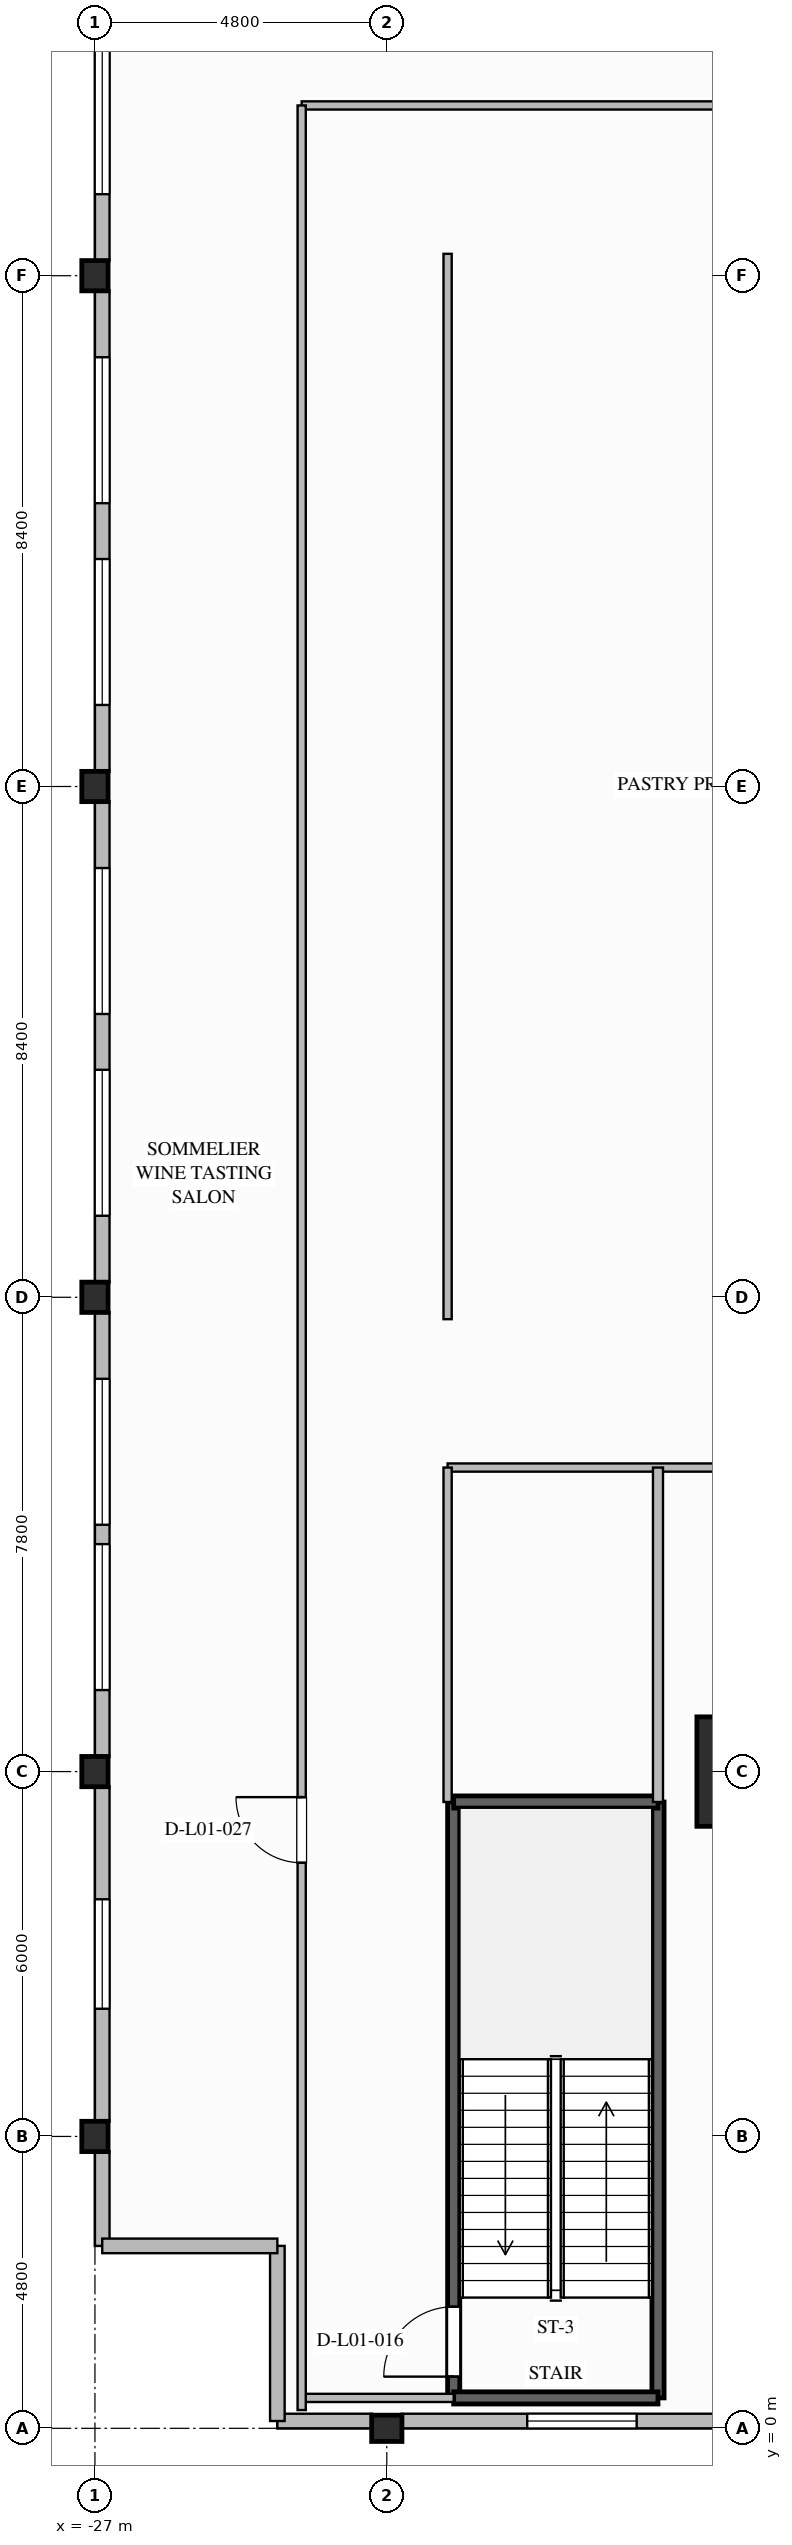
"""IFC4 building model, lengths in metres.
Left out: names, types, materials, properties, quantities, classifications, styles, units other than length and angle.
Written with IfcOpenShell. Run it as: python <this file> out.ifc"""

import sys

from ifc_helpers import new_model, si_unit, direction, frame, frame_2d, origin, origin_2d, place, context, subcontext, project, spatial, rectangle, i_section, extrude, element, fill, save


model = new_model("IFC4")
c1 = context("Model", 3, precision=1e-05, world=origin(), true_north=direction((0.0, 1.0)))
c2 = subcontext(c1, "Body", "Model", "MODEL_VIEW")
j1 = project(units=[si_unit("LENGTHUNIT", "METRE"), si_unit("PLANEANGLEUNIT", "RADIAN")], contexts=[c1])
p1 = place(None, origin())
s1 = spatial("IfcSite", under=j1, at=p1, CompositionType="ELEMENT")
p2 = place(p1, origin())
s2 = spatial("IfcBuilding", under=s1, at=p2, CompositionType="ELEMENT")
p3 = place(p2, frame((0.0, 0.0, 5.6)))
s3 = spatial("IfcBuildingStorey", under=s2, at=p3, CompositionType="ELEMENT", Elevation=5.6)
p4 = place(p3, frame((-16.2, 10.8, 0.0), z_axis=(0.0, 0.0, 1.0), x_axis=(1.0, 0.0, 0.0)))
e1 = element("IfcColumn", 1, at=p4, inside=s3, PredefinedType="COLUMN", context=c2, shape_type="SweptSolid", body=[
    extrude(rectangle(XDim=1.8, YDim=1.8, at=origin_2d()), origin(), (0.0, 0.0, 1.0), 5.2),
])
for number, where, z_axis, x_axis in (
    (2, (-27.0, 4.8, 0.0), (0.0, 0.0, 1.0), (1.0, 0.0, 0.0)),
    (3, (-27.0, 10.8, 0.0), (0.0, 0.0, 1.0), (1.0, 0.0, 0.0)),
    (4, (-27.0, 18.6, 0.0), (0.0, 0.0, 1.0), (1.0, 0.0, 0.0)),
    (5, (-27.0, 27.0, 0.0), (0.0, 0.0, 1.0), (1.0, 0.0, 0.0)),
    (6, (-27.0, 35.4, 0.0), (0.0, 0.0, 1.0), (1.0, 0.0, 0.0)),
    (7, (-22.2, 0.0, 0.0), (0.0, 0.0, 1.0), (0.0, 1.0, 0.0)),
):
    element("IfcColumn", number, at=place(p3, frame(where, z_axis=z_axis, x_axis=x_axis)), inside=s3, PredefinedType="COLUMN", context=c2, shape_type="SweptSolid", body=[
        extrude(i_section(OverallWidth=0.432, OverallDepth=0.498, WebThickness=0.056, FlangeThickness=0.089, FilletRadius=0.03, at=origin_2d()), origin(), (0.0, 0.0, 1.0), 5.2),
    ])
p5 = place(p3, frame((-26.88, 3.0, 0.0), z_axis=(0.0, 0.0, 1.0), x_axis=(0.0, 1.0, 0.0)))
e8 = element("IfcWall", 8, at=p5, inside=s3, PredefinedType="STANDARD", context=c2, shape_type="SweptSolid", body=[
    extrude(rectangle(XDim=1.559, YDim=0.24, at=frame_2d((0.78, 0.0))), origin(), (0.0, 0.0, 1.0), 4.85),
])
p6 = place(p3, frame((-26.88, 5.041, 0.0), z_axis=(0.0, 0.0, 1.0), x_axis=(0.0, 1.0, 0.0)))
e9 = element("IfcWall", 9, at=p6, inside=s3, PredefinedType="STANDARD", context=c2, shape_type="SweptSolid", body=[
    extrude(rectangle(XDim=5.518, YDim=0.24, at=frame_2d((2.759, 0.0))), origin(), (0.0, 0.0, 1.0), 4.154),
])
p7 = place(p6, frame((1.859, 0.0, 0.7)))
e10 = element("IfcOpeningElement", 10, at=p7, cuts=e9, PredefinedType="OPENING", context=c2, shape_type="SweptSolid", body=[
    extrude(rectangle(XDim=1.8, YDim=2.2, at=frame_2d((0.9, 1.1))), frame((0.0, 0.13, 0.0), z_axis=(0.0, -1.0, 0.0), x_axis=(1.0, 0.0, 0.0)), (0.0, 0.0, 1.0), 0.26),
])
p8 = place(p3, frame((-26.88, 11.041, 0.0), z_axis=(0.0, 0.0, 1.0), x_axis=(0.0, 1.0, 0.0)))
e11 = element("IfcWall", 11, at=p8, inside=s3, PredefinedType="STANDARD", context=c2, shape_type="SweptSolid", body=[
    extrude(rectangle(XDim=7.318, YDim=0.24, at=frame_2d((3.659, 0.0))), origin(), (0.0, 0.0, 1.0), 4.154),
])
p9 = place(p8, frame((1.1, 0.0, 0.7)))
e12 = element("IfcOpeningElement", 12, at=p9, cuts=e11, PredefinedType="OPENING", context=c2, shape_type="SweptSolid", body=[
    extrude(rectangle(XDim=2.4, YDim=2.4, at=frame_2d((1.2, 1.2))), frame((0.0, 0.13, 0.0), z_axis=(0.0, -1.0, 0.0), x_axis=(1.0, 0.0, 0.0)), (0.0, 0.0, 1.0), 0.26),
])
p10 = place(p8, frame((3.818, 0.0, 0.7)))
e13 = element("IfcOpeningElement", 13, at=p10, cuts=e11, PredefinedType="OPENING", context=c2, shape_type="SweptSolid", body=[
    extrude(rectangle(XDim=2.4, YDim=2.4, at=frame_2d((1.2, 1.2))), frame((0.0, 0.13, 0.0), z_axis=(0.0, -1.0, 0.0), x_axis=(1.0, 0.0, 0.0)), (0.0, 0.0, 1.0), 0.26),
])
p11 = place(p3, frame((-26.88, 18.841, 0.0), z_axis=(0.0, 0.0, 1.0), x_axis=(0.0, 1.0, 0.0)))
e14 = element("IfcWall", 14, at=p11, inside=s3, PredefinedType="STANDARD", context=c2, shape_type="SweptSolid", body=[
    extrude(rectangle(XDim=7.918, YDim=0.24, at=frame_2d((3.959, 0.0))), origin(), (0.0, 0.0, 1.0), 4.154),
])
p12 = place(p11, frame((1.1, 0.0, 0.7)))
e15 = element("IfcOpeningElement", 15, at=p12, cuts=e14, PredefinedType="OPENING", context=c2, shape_type="SweptSolid", body=[
    extrude(rectangle(XDim=2.4, YDim=2.4, at=frame_2d((1.2, 1.2))), frame((0.0, 0.13, 0.0), z_axis=(0.0, -1.0, 0.0), x_axis=(1.0, 0.0, 0.0)), (0.0, 0.0, 1.0), 0.26),
])
p13 = place(p11, frame((4.418, 0.0, 0.7)))
e16 = element("IfcOpeningElement", 16, at=p13, cuts=e14, PredefinedType="OPENING", context=c2, shape_type="SweptSolid", body=[
    extrude(rectangle(XDim=2.4, YDim=2.4, at=frame_2d((1.2, 1.2))), frame((0.0, 0.13, 0.0), z_axis=(0.0, -1.0, 0.0), x_axis=(1.0, 0.0, 0.0)), (0.0, 0.0, 1.0), 0.26),
])
p14 = place(p3, frame((-26.88, 27.241, 0.0), z_axis=(0.0, 0.0, 1.0), x_axis=(0.0, 1.0, 0.0)))
e17 = element("IfcWall", 17, at=p14, inside=s3, PredefinedType="STANDARD", context=c2, shape_type="SweptSolid", body=[
    extrude(rectangle(XDim=7.918, YDim=0.24, at=frame_2d((3.959, 0.0))), origin(), (0.0, 0.0, 1.0), 4.154),
])
p15 = place(p14, frame((1.1, 0.0, 0.7)))
e18 = element("IfcOpeningElement", 18, at=p15, cuts=e17, PredefinedType="OPENING", context=c2, shape_type="SweptSolid", body=[
    extrude(rectangle(XDim=2.4, YDim=2.4, at=frame_2d((1.2, 1.2))), frame((0.0, 0.13, 0.0), z_axis=(0.0, -1.0, 0.0), x_axis=(1.0, 0.0, 0.0)), (0.0, 0.0, 1.0), 0.26),
])
p16 = place(p14, frame((4.418, 0.0, 0.7)))
e19 = element("IfcOpeningElement", 19, at=p16, cuts=e17, PredefinedType="OPENING", context=c2, shape_type="SweptSolid", body=[
    extrude(rectangle(XDim=2.4, YDim=2.4, at=frame_2d((1.2, 1.2))), frame((0.0, 0.13, 0.0), z_axis=(0.0, -1.0, 0.0), x_axis=(1.0, 0.0, 0.0)), (0.0, 0.0, 1.0), 0.26),
])
p17 = place(p3, frame((-26.88, 35.641, 0.0), z_axis=(0.0, 0.0, 1.0), x_axis=(0.0, 1.0, 0.0)))
e20 = element("IfcWall", 20, at=p17, inside=s3, PredefinedType="STANDARD", context=c2, shape_type="SweptSolid", body=[
    extrude(rectangle(XDim=7.318, YDim=0.24, at=frame_2d((3.659, 0.0))), origin(), (0.0, 0.0, 1.0), 4.154),
])
p18 = place(p17, frame((1.1, 0.0, 0.7)))
e21 = element("IfcOpeningElement", 21, at=p18, cuts=e20, PredefinedType="OPENING", context=c2, shape_type="SweptSolid", body=[
    extrude(rectangle(XDim=2.4, YDim=2.4, at=frame_2d((1.2, 1.2))), frame((0.0, 0.13, 0.0), z_axis=(0.0, -1.0, 0.0), x_axis=(1.0, 0.0, 0.0)), (0.0, 0.0, 1.0), 0.26),
])
p19 = place(p17, frame((3.818, 0.0, 0.7)))
e22 = element("IfcOpeningElement", 22, at=p19, cuts=e20, PredefinedType="OPENING", context=c2, shape_type="SweptSolid", body=[
    extrude(rectangle(XDim=2.4, YDim=2.4, at=frame_2d((1.2, 1.2))), frame((0.0, 0.13, 0.0), z_axis=(0.0, -1.0, 0.0), x_axis=(1.0, 0.0, 0.0)), (0.0, 0.0, 1.0), 0.26),
])
p20 = place(p3, frame((-22.441, 0.12, 0.0), z_axis=(0.0, 0.0, 1.0), x_axis=(-1.0, 0.0, 0.0)))
e23 = element("IfcWall", 23, at=p20, inside=s3, PredefinedType="STANDARD", context=c2, shape_type="SweptSolid", body=[
    extrude(rectangle(XDim=1.559, YDim=0.24, at=frame_2d((0.78, 0.0))), origin(), (0.0, 0.0, 1.0), 4.85),
])
p21 = place(p3, frame((-16.441, 0.12, 0.0), z_axis=(0.0, 0.0, 1.0), x_axis=(-1.0, 0.0, 0.0)))
e24 = element("IfcWall", 24, at=p21, inside=s3, PredefinedType="STANDARD", context=c2, shape_type="SweptSolid", body=[
    extrude(rectangle(XDim=5.518, YDim=0.24, at=frame_2d((2.759, 0.0))), origin(), (0.0, 0.0, 1.0), 4.154),
])
p22 = place(p21, frame((1.65, 0.0, 0.65)))
e25 = element("IfcOpeningElement", 25, at=p22, cuts=e24, PredefinedType="OPENING", context=c2, shape_type="SweptSolid", body=[
    extrude(rectangle(XDim=1.8, YDim=2.2, at=frame_2d((0.9, 1.1))), frame((0.0, 0.13, 0.0), z_axis=(0.0, -1.0, 0.0), x_axis=(1.0, 0.0, 0.0)), (0.0, 0.0, 1.0), 0.26),
])
for number, where, z_axis, x_axis in (
    (26, (-24.0, 0.12, 0.0), (0.0, 0.0, 1.0), (0.0, 1.0, 0.0)),
    (27, (-24.0, 3.0, 0.0), (0.0, 0.0, 1.0), (-1.0, 0.0, 0.0)),
):
    element("IfcWall", number, at=place(p3, frame(where, z_axis=z_axis, x_axis=x_axis)), inside=s3, PredefinedType="STANDARD", context=c2, shape_type="SweptSolid", body=[
        extrude(rectangle(XDim=2.88, YDim=0.24, at=frame_2d((1.44, 0.0))), origin(), (0.0, 0.0, 1.0), 4.85),
    ])
p23 = place(p3, frame((-21.1, 0.5, 0.0), z_axis=(0.0, 0.0, 1.0), x_axis=(0.0, 1.0, 0.0)))
e28 = element("IfcWall", 28, at=p23, inside=s3, PredefinedType="SOLIDWALL", context=c2, shape_type="SweptSolid", body=[
    extrude(rectangle(XDim=9.8, YDim=0.2, at=frame_2d((4.9, 0.0))), origin(), (0.0, 0.0, 1.0), 4.85),
])
p24 = place(p23, frame((0.35, 0.0, 0.0)))
e29 = element("IfcOpeningElement", 29, at=p24, cuts=e28, PredefinedType="OPENING", context=c2, shape_type="SweptSolid", body=[
    extrude(rectangle(XDim=1.15, YDim=2.15, at=frame_2d((0.575, 1.075))), frame((0.0, 0.11, 0.0), z_axis=(0.0, -1.0, 0.0), x_axis=(1.0, 0.0, 0.0)), (0.0, 0.0, 1.0), 0.22),
])
p25 = place(p3, frame((-17.74, 10.3, 0.0), z_axis=(0.0, 0.0, 1.0), x_axis=(0.0, -1.0, 0.0)))
e30 = element("IfcWall", 30, at=p25, inside=s3, PredefinedType="SOLIDWALL", context=c2, shape_type="SweptSolid", body=[
    extrude(rectangle(XDim=9.8, YDim=0.2, at=frame_2d((4.9, 0.0))), origin(), (0.0, 0.0, 1.0), 4.85),
])
for number, where, z_axis, x_axis in (
    (31, (-21.1, 0.5, 0.0), (0.0, 0.0, 1.0), (1.0, 0.0, 0.0)),
    (32, (-17.74, 10.3, 0.0), (0.0, 0.0, 1.0), (-1.0, 0.0, 0.0)),
):
    element("IfcWall", number, at=place(p3, frame(where, z_axis=z_axis, x_axis=x_axis)), inside=s3, PredefinedType="SOLIDWALL", context=c2, shape_type="SweptSolid", body=[
        extrude(rectangle(XDim=3.36, YDim=0.2, at=frame_2d((1.68, 0.0))), origin(), (0.0, 0.0, 1.0), 4.85),
    ])
p26 = place(p3, frame((-21.2, 15.8, 0.0), z_axis=(0.0, 0.0, 1.0), x_axis=(1.0, 0.0, 0.0)))
e33 = element("IfcWall", 33, at=p26, inside=s3, PredefinedType="PARTITIONING", context=c2, shape_type="SweptSolid", body=[
    extrude(rectangle(XDim=46.3, YDim=0.135, at=frame_2d((23.15, 0.0))), origin(), (0.0, 0.0, 1.0), 4.85),
])
p27 = place(p26, frame((6.0, 0.0, 0.0)))
e34 = element("IfcOpeningElement", 34, at=p27, cuts=e33, PredefinedType="OPENING", context=c2, shape_type="SweptSolid", body=[
    extrude(rectangle(XDim=1.8, YDim=2.35, at=frame_2d((0.9, 1.175))), frame((0.0, 0.077, 0.0), z_axis=(0.0, -1.0, 0.0), x_axis=(1.0, 0.0, 0.0)), (0.0, 0.0, 1.0), 0.155),
])
p28 = place(p26, frame((33.2, 0.0, 0.0)))
e35 = element("IfcOpeningElement", 35, at=p28, cuts=e33, PredefinedType="OPENING", context=c2, shape_type="SweptSolid", body=[
    extrude(rectangle(XDim=1.8, YDim=2.35, at=frame_2d((0.9, 1.175))), frame((0.0, 0.077, 0.0), z_axis=(0.0, -1.0, 0.0), x_axis=(1.0, 0.0, 0.0)), (0.0, 0.0, 1.0), 0.155),
])
p29 = place(p3, frame((-23.6, 38.2, 0.0), z_axis=(0.0, 0.0, 1.0), x_axis=(1.0, 0.0, 0.0)))
e36 = element("IfcWall", 36, at=p29, inside=s3, PredefinedType="PARTITIONING", context=c2, shape_type="SweptSolid", body=[
    extrude(rectangle(XDim=47.3, YDim=0.135, at=frame_2d((23.65, 0.0))), origin(), (0.0, 0.0, 1.0), 4.85),
])
p30 = place(p29, frame((39.2, 0.0, 0.0)))
e37 = element("IfcOpeningElement", 37, at=p30, cuts=e36, PredefinedType="OPENING", context=c2, shape_type="SweptSolid", body=[
    extrude(rectangle(XDim=0.98, YDim=2.1, at=frame_2d((0.49, 1.05))), frame((0.0, 0.077, 0.0), z_axis=(0.0, -1.0, 0.0), x_axis=(1.0, 0.0, 0.0)), (0.0, 0.0, 1.0), 0.155),
])
p31 = place(p29, frame((44.0, 0.0, 0.0)))
e38 = element("IfcOpeningElement", 38, at=p31, cuts=e36, PredefinedType="OPENING", context=c2, shape_type="SweptSolid", body=[
    extrude(rectangle(XDim=0.92, YDim=2.1, at=frame_2d((0.46, 1.05))), frame((0.0, 0.077, 0.0), z_axis=(0.0, -1.0, 0.0), x_axis=(1.0, 0.0, 0.0)), (0.0, 0.0, 1.0), 0.155),
])
p32 = place(p29, frame((12.0, 0.0, 0.0)))
e39 = element("IfcOpeningElement", 39, at=p32, cuts=e36, PredefinedType="OPENING", context=c2, shape_type="SweptSolid", body=[
    extrude(rectangle(XDim=1.36, YDim=2.2, at=frame_2d((0.68, 1.1))), frame((0.0, 0.077, 0.0), z_axis=(0.0, -1.0, 0.0), x_axis=(1.0, 0.0, 0.0)), (0.0, 0.0, 1.0), 0.155),
])
p33 = place(p29, frame((28.0, 0.0, 0.0)))
e40 = element("IfcOpeningElement", 40, at=p33, cuts=e36, PredefinedType="OPENING", context=c2, shape_type="SweptSolid", body=[
    extrude(rectangle(XDim=1.26, YDim=2.2, at=frame_2d((0.63, 1.1))), frame((0.0, 0.077, 0.0), z_axis=(0.0, -1.0, 0.0), x_axis=(1.0, 0.0, 0.0)), (0.0, 0.0, 1.0), 0.155),
])
p34 = place(p3, frame((-17.74, 10.3, 0.0), z_axis=(0.0, 0.0, 1.0), x_axis=(0.0, 1.0, 0.0)))
e41 = element("IfcWall", 41, at=p34, inside=s3, PredefinedType="PARTITIONING", context=c2, shape_type="SweptSolid", body=[
    extrude(rectangle(XDim=5.5, YDim=0.165, at=frame_2d((2.75, 0.0))), origin(), (0.0, 0.0, 1.0), 4.85),
])
p35 = place(p3, frame((-21.2, 10.3, 0.0), z_axis=(0.0, 0.0, 1.0), x_axis=(0.0, 1.0, 0.0)))
e42 = element("IfcWall", 42, at=p35, inside=s3, PredefinedType="PARTITIONING", context=c2, shape_type="SweptSolid", body=[
    extrude(rectangle(XDim=5.5, YDim=0.135, at=frame_2d((2.75, 0.0))), origin(), (0.0, 0.0, 1.0), 4.85),
])
p36 = place(p3, frame((-21.2, 18.24, 0.0), z_axis=(0.0, 0.0, 1.0), x_axis=(0.0, 1.0, 0.0)))
e43 = element("IfcWall", 43, at=p36, inside=s3, PredefinedType="PARTITIONING", context=c2, shape_type="SweptSolid", body=[
    extrude(rectangle(XDim=17.52, YDim=0.135, at=frame_2d((8.76, 0.0))), origin(), (0.0, 0.0, 1.0), 4.85),
])
p37 = place(p3, frame((-23.6, 0.5, 0.0), z_axis=(0.0, 0.0, 1.0), x_axis=(1.0, 0.0, 0.0)))
e44 = element("IfcWall", 44, at=p37, inside=s3, PredefinedType="PARTITIONING", context=c2, shape_type="SweptSolid", body=[
    extrude(rectangle(XDim=2.5, YDim=0.135, at=frame_2d((1.25, 0.0))), origin(), (0.0, 0.0, 1.0), 4.85),
])
p38 = place(p3, frame((-23.6, 0.3, 0.0), z_axis=(0.0, 0.0, 1.0), x_axis=(0.0, 1.0, 0.0)))
e45 = element("IfcWall", 45, at=p38, inside=s3, PredefinedType="PARTITIONING", context=c2, shape_type="SweptSolid", body=[
    extrude(rectangle(XDim=37.9, YDim=0.135, at=frame_2d((18.95, 0.0))), origin(), (0.0, 0.0, 1.0), 4.85),
])
p39 = place(p38, frame((9.0, 0.0, 0.0)))
e46 = element("IfcOpeningElement", 46, at=p39, cuts=e45, PredefinedType="OPENING", context=c2, shape_type="SweptSolid", body=[
    extrude(rectangle(XDim=1.08, YDim=2.04, at=frame_2d((0.54, 1.02))), frame((0.0, 0.077, 0.0), z_axis=(0.0, -1.0, 0.0), x_axis=(1.0, 0.0, 0.0)), (0.0, 0.0, 1.0), 0.155),
])
p40 = place(p7, origin())
e47 = element("IfcWindow", 47, at=p40, inside=s3, PartitioningType="SINGLE_PANEL", PredefinedType="WINDOW", context=c2, shape_type="SweptSolid", body=[
    extrude(rectangle(XDim=1.8, YDim=2.2, at=frame_2d((0.9, 1.1))), frame((0.0, 0.03, 0.0), z_axis=(0.0, -1.0, 0.0), x_axis=(1.0, 0.0, 0.0)), (0.0, 0.0, 1.0), 0.06),
])
fill(e10, e47)
p41 = place(p9, origin())
e48 = element("IfcWindow", 48, at=p41, inside=s3, PartitioningType="SINGLE_PANEL", PredefinedType="WINDOW", context=c2, shape_type="SweptSolid", body=[
    extrude(rectangle(XDim=2.4, YDim=2.4, at=frame_2d((1.2, 1.2))), frame((0.0, 0.03, 0.0), z_axis=(0.0, -1.0, 0.0), x_axis=(1.0, 0.0, 0.0)), (0.0, 0.0, 1.0), 0.06),
])
fill(e12, e48)
p42 = place(p10, origin())
e49 = element("IfcWindow", 49, at=p42, inside=s3, PartitioningType="SINGLE_PANEL", PredefinedType="WINDOW", context=c2, shape_type="SweptSolid", body=[
    extrude(rectangle(XDim=2.4, YDim=2.4, at=frame_2d((1.2, 1.2))), frame((0.0, 0.03, 0.0), z_axis=(0.0, -1.0, 0.0), x_axis=(1.0, 0.0, 0.0)), (0.0, 0.0, 1.0), 0.06),
])
fill(e13, e49)
p43 = place(p12, origin())
e50 = element("IfcWindow", 50, at=p43, inside=s3, PartitioningType="SINGLE_PANEL", PredefinedType="WINDOW", context=c2, shape_type="SweptSolid", body=[
    extrude(rectangle(XDim=2.4, YDim=2.4, at=frame_2d((1.2, 1.2))), frame((0.0, 0.03, 0.0), z_axis=(0.0, -1.0, 0.0), x_axis=(1.0, 0.0, 0.0)), (0.0, 0.0, 1.0), 0.06),
])
fill(e15, e50)
p44 = place(p13, origin())
e51 = element("IfcWindow", 51, at=p44, inside=s3, PartitioningType="SINGLE_PANEL", PredefinedType="WINDOW", context=c2, shape_type="SweptSolid", body=[
    extrude(rectangle(XDim=2.4, YDim=2.4, at=frame_2d((1.2, 1.2))), frame((0.0, 0.03, 0.0), z_axis=(0.0, -1.0, 0.0), x_axis=(1.0, 0.0, 0.0)), (0.0, 0.0, 1.0), 0.06),
])
fill(e16, e51)
p45 = place(p15, origin())
e52 = element("IfcWindow", 52, at=p45, inside=s3, PartitioningType="SINGLE_PANEL", PredefinedType="WINDOW", context=c2, shape_type="SweptSolid", body=[
    extrude(rectangle(XDim=2.4, YDim=2.4, at=frame_2d((1.2, 1.2))), frame((0.0, 0.03, 0.0), z_axis=(0.0, -1.0, 0.0), x_axis=(1.0, 0.0, 0.0)), (0.0, 0.0, 1.0), 0.06),
])
fill(e18, e52)
p46 = place(p16, origin())
e53 = element("IfcWindow", 53, at=p46, inside=s3, PartitioningType="SINGLE_PANEL", PredefinedType="WINDOW", context=c2, shape_type="SweptSolid", body=[
    extrude(rectangle(XDim=2.4, YDim=2.4, at=frame_2d((1.2, 1.2))), frame((0.0, 0.03, 0.0), z_axis=(0.0, -1.0, 0.0), x_axis=(1.0, 0.0, 0.0)), (0.0, 0.0, 1.0), 0.06),
])
fill(e19, e53)
p47 = place(p18, origin())
e54 = element("IfcWindow", 54, at=p47, inside=s3, PartitioningType="SINGLE_PANEL", PredefinedType="WINDOW", context=c2, shape_type="SweptSolid", body=[
    extrude(rectangle(XDim=2.4, YDim=2.4, at=frame_2d((1.2, 1.2))), frame((0.0, 0.03, 0.0), z_axis=(0.0, -1.0, 0.0), x_axis=(1.0, 0.0, 0.0)), (0.0, 0.0, 1.0), 0.06),
])
fill(e21, e54)
p48 = place(p22, origin())
e55 = element("IfcWindow", 55, at=p48, inside=s3, PartitioningType="SINGLE_PANEL", PredefinedType="WINDOW", context=c2, shape_type="SweptSolid", body=[
    extrude(rectangle(XDim=1.8, YDim=2.2, at=frame_2d((0.9, 1.1))), frame((0.0, 0.03, 0.0), z_axis=(0.0, -1.0, 0.0), x_axis=(1.0, 0.0, 0.0)), (0.0, 0.0, 1.0), 0.06),
])
fill(e25, e55)
p49 = place(p24, origin())
e56 = element("IfcDoor", 56, at=p49, inside=s3, OperationType="SINGLE_SWING_LEFT", PredefinedType="DOOR", context=c2, shape_type="SweptSolid", body=[
    extrude(rectangle(XDim=1.15, YDim=2.15, at=frame_2d((0.575, 1.075))), frame((0.0, 0.025, 0.0), z_axis=(0.0, -1.0, 0.0), x_axis=(1.0, 0.0, 0.0)), (0.0, 0.0, 1.0), 0.05),
])
fill(e29, e56)
p50 = place(p39, origin())
e57 = element("IfcDoor", 57, at=p50, inside=s3, OperationType="SINGLE_SWING_RIGHT", PredefinedType="DOOR", context=c2, shape_type="SweptSolid", body=[
    extrude(rectangle(XDim=1.08, YDim=2.04, at=frame_2d((0.54, 1.02))), frame((0.0, 0.025, 0.0), z_axis=(0.0, -1.0, 0.0), x_axis=(1.0, 0.0, 0.0)), (0.0, 0.0, 1.0), 0.05),
])
fill(e46, e57)
save(model, sys.argv[1])
